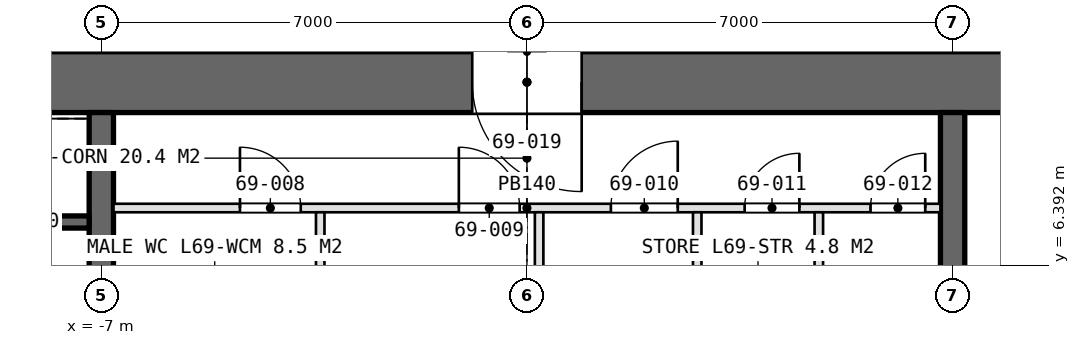
"""IFC4 building model, lengths in metres.
Left out: names, types, materials, properties, quantities, classifications, styles, units other than length and angle.
Written with IfcOpenShell. Run it as: python <this file> out.ifc"""

import sys

from ifc_helpers import new_model, si_unit, direction, frame, frame_2d, origin, place, context, subcontext, project, spatial, rectangle, extrude, element, fill, save


model = new_model("IFC4")
c1 = context("Model", 3, precision=1e-05, world=origin(), true_north=direction((0.0, 1.0)))
c2 = subcontext(c1, "Body", "Model", "MODEL_VIEW")
j1 = project(units=[si_unit("LENGTHUNIT", "METRE"), si_unit("PLANEANGLEUNIT", "RADIAN")], contexts=[c1])
p1 = place(None, origin())
s1 = spatial("IfcSite", under=j1, at=p1, CompositionType="ELEMENT")
p2 = place(p1, origin())
s2 = spatial("IfcBuilding", under=s1, at=p2, CompositionType="ELEMENT")
p3 = place(p2, frame((0.0, 0.0, 309.0)))
s3 = spatial("IfcBuildingStorey", under=s2, at=p3, CompositionType="ELEMENT", Elevation=309.0)
p4 = place(p3, frame((13.9, 9.4, 0.0), z_axis=(0.0, 0.0, 1.0), x_axis=(-1.0, 0.0, 0.0)))
e1 = element("IfcWall", 1, at=p4, inside=s3, PredefinedType="SHEAR", context=c2, shape_type="SweptSolid", body=[
    extrude(rectangle(XDim=27.8, YDim=1.0, at=frame_2d((13.9, 0.0))), origin(), (0.0, 0.0, 1.0), 4.2),
])
p5 = place(p4, frame((23.9, 0.0, 0.0)))
e2 = element("IfcOpeningElement", 2, at=p5, cuts=e1, PredefinedType="OPENING", context=c2, shape_type="SweptSolid", body=[
    extrude(rectangle(XDim=1.0, YDim=2.4, at=frame_2d((0.5, 1.2))), frame((0.0, 0.51, 0.0), z_axis=(0.0, -1.0, 0.0), x_axis=(1.0, 0.0, 0.0)), (0.0, 0.0, 1.0), 1.02),
])
p6 = place(p4, frame((13.0, 0.0, 0.0)))
e3 = element("IfcOpeningElement", 3, at=p6, cuts=e1, PredefinedType="OPENING", context=c2, shape_type="SweptSolid", body=[
    extrude(rectangle(XDim=1.8, YDim=2.4, at=frame_2d((0.9, 1.2))), frame((0.0, 0.51, 0.0), z_axis=(0.0, -1.0, 0.0), x_axis=(1.0, 0.0, 0.0)), (0.0, 0.0, 1.0), 1.02),
])
p7 = place(p3, frame((-7.0, -8.9, 0.0), z_axis=(0.0, 0.0, 1.0), x_axis=(0.0, 1.0, 0.0)))
e4 = element("IfcWall", 4, at=p7, inside=s3, PredefinedType="SHEAR", context=c2, shape_type="SweptSolid", body=[
    extrude(rectangle(XDim=17.8, YDim=0.4, at=frame_2d((8.9, 0.0))), origin(), (0.0, 0.0, 1.0), 4.2),
])
p8 = place(p7, frame((8.0, 0.0, 0.0)))
e5 = element("IfcOpeningElement", 5, at=p8, cuts=e4, PredefinedType="OPENING", context=c2, shape_type="SweptSolid", body=[
    extrude(rectangle(XDim=1.8, YDim=2.4, at=frame_2d((0.9, 1.2))), frame((0.0, 0.21, 0.0), z_axis=(0.0, -1.0, 0.0), x_axis=(1.0, 0.0, 0.0)), (0.0, 0.0, 1.0), 0.42),
])
p9 = place(p3, frame((7.0, -8.9, 0.0), z_axis=(0.0, 0.0, 1.0), x_axis=(0.0, 1.0, 0.0)))
e6 = element("IfcWall", 6, at=p9, inside=s3, PredefinedType="SHEAR", context=c2, shape_type="SweptSolid", body=[
    extrude(rectangle(XDim=17.8, YDim=0.4, at=frame_2d((8.9, 0.0))), origin(), (0.0, 0.0, 1.0), 4.2),
])
p10 = place(p9, frame((8.0, 0.0, 0.0)))
e7 = element("IfcOpeningElement", 7, at=p10, cuts=e6, PredefinedType="OPENING", context=c2, shape_type="SweptSolid", body=[
    extrude(rectangle(XDim=1.8, YDim=2.4, at=frame_2d((0.9, 1.2))), frame((0.0, 0.21, 0.0), z_axis=(0.0, -1.0, 0.0), x_axis=(1.0, 0.0, 0.0)), (0.0, 0.0, 1.0), 0.42),
])
p11 = place(p3, frame((-6.8, 7.33, 0.0), z_axis=(0.0, 0.0, 1.0), x_axis=(1.0, 0.0, 0.0)))
e8 = element("IfcWall", 8, at=p11, inside=s3, PredefinedType="PARTITIONING", context=c2, shape_type="SweptSolid", body=[
    extrude(rectangle(XDim=13.6, YDim=0.14, at=frame_2d((6.8, 0.0))), origin(), (0.0, 0.0, 1.0), 3.95),
])
p12 = place(p11, frame((2.08, 0.0, 0.0)))
e9 = element("IfcOpeningElement", 9, at=p12, cuts=e8, PredefinedType="OPENING", context=c2, shape_type="SweptSolid", body=[
    extrude(rectangle(XDim=1.0, YDim=2.4, at=frame_2d((0.5, 1.2))), frame((0.0, 0.08, 0.0), z_axis=(0.0, -1.0, 0.0), x_axis=(1.0, 0.0, 0.0)), (0.0, 0.0, 1.0), 0.16),
])
p13 = place(p11, frame((5.68, 0.0, 0.0)))
e10 = element("IfcOpeningElement", 10, at=p13, cuts=e8, PredefinedType="OPENING", context=c2, shape_type="SweptSolid", body=[
    extrude(rectangle(XDim=1.0, YDim=2.4, at=frame_2d((0.5, 1.2))), frame((0.0, 0.08, 0.0), z_axis=(0.0, -1.0, 0.0), x_axis=(1.0, 0.0, 0.0)), (0.0, 0.0, 1.0), 0.16),
])
p14 = place(p11, frame((8.18, 0.0, 0.0)))
e11 = element("IfcOpeningElement", 11, at=p14, cuts=e8, PredefinedType="OPENING", context=c2, shape_type="SweptSolid", body=[
    extrude(rectangle(XDim=1.1, YDim=2.4, at=frame_2d((0.55, 1.2))), frame((0.0, 0.08, 0.0), z_axis=(0.0, -1.0, 0.0), x_axis=(1.0, 0.0, 0.0)), (0.0, 0.0, 1.0), 0.16),
])
p15 = place(p11, frame((10.38, 0.0, 0.0)))
e12 = element("IfcOpeningElement", 12, at=p15, cuts=e8, PredefinedType="OPENING", context=c2, shape_type="SweptSolid", body=[
    extrude(rectangle(XDim=0.9, YDim=2.4, at=frame_2d((0.45, 1.2))), frame((0.0, 0.08, 0.0), z_axis=(0.0, -1.0, 0.0), x_axis=(1.0, 0.0, 0.0)), (0.0, 0.0, 1.0), 0.16),
])
p16 = place(p11, frame((12.45, 0.0, 0.0)))
e13 = element("IfcOpeningElement", 13, at=p16, cuts=e8, PredefinedType="OPENING", context=c2, shape_type="SweptSolid", body=[
    extrude(rectangle(XDim=0.9, YDim=2.4, at=frame_2d((0.45, 1.2))), frame((0.0, 0.08, 0.0), z_axis=(0.0, -1.0, 0.0), x_axis=(1.0, 0.0, 0.0)), (0.0, 0.0, 1.0), 0.16),
])
for number, where, z_axis, x_axis in (
    (14, (-3.4, 4.7, 0.0), (0.0, 0.0, 1.0), (0.0, 1.0, 0.0)),
    (15, (0.2, 4.7, 0.0), (0.0, 0.0, 1.0), (0.0, 1.0, 0.0)),
    (16, (2.8, 4.7, 0.0), (0.0, 0.0, 1.0), (0.0, 1.0, 0.0)),
    (17, (4.8, 4.7, 0.0), (0.0, 0.0, 1.0), (0.0, 1.0, 0.0)),
):
    element("IfcWall", number, at=place(p3, frame(where, z_axis=z_axis, x_axis=x_axis)), inside=s3, PredefinedType="PARTITIONING", context=c2, shape_type="SweptSolid", body=[
        extrude(rectangle(XDim=2.56, YDim=0.14, at=frame_2d((1.28, 0.0))), origin(), (0.0, 0.0, 1.0), 3.95),
    ])
p17 = place(p3, frame((-9.15, 7.1, 0.0), z_axis=(0.0, 0.0, 1.0), x_axis=(1.0, 0.0, 0.0)))
e18 = element("IfcWall", 18, at=p17, inside=s3, PredefinedType="SOLIDWALL", context=c2, shape_type="SweptSolid", body=[
    extrude(rectangle(XDim=1.95, YDim=0.2, at=frame_2d((0.975, 0.0))), origin(), (0.0, 0.0, 1.0), 4.2),
])
p18 = place(p12, origin())
e19 = element("IfcDoor", 19, at=p18, inside=s3, OperationType="SINGLE_SWING_LEFT", PredefinedType="DOOR", context=c2, shape_type="SweptSolid", body=[
    extrude(rectangle(XDim=1.0, YDim=2.4, at=frame_2d((0.5, 1.2))), frame((0.0, 0.025, 0.0), z_axis=(0.0, -1.0, 0.0), x_axis=(1.0, 0.0, 0.0)), (0.0, 0.0, 1.0), 0.05),
])
fill(e9, e19)
p19 = place(p13, origin())
e20 = element("IfcDoor", 20, at=p19, inside=s3, OperationType="SINGLE_SWING_LEFT", PredefinedType="DOOR", context=c2, shape_type="SweptSolid", body=[
    extrude(rectangle(XDim=1.0, YDim=2.4, at=frame_2d((0.5, 1.2))), frame((0.0, 0.025, 0.0), z_axis=(0.0, -1.0, 0.0), x_axis=(1.0, 0.0, 0.0)), (0.0, 0.0, 1.0), 0.05),
])
fill(e10, e20)
p20 = place(p14, origin())
e21 = element("IfcDoor", 21, at=p20, inside=s3, OperationType="SINGLE_SWING_RIGHT", PredefinedType="DOOR", context=c2, shape_type="SweptSolid", body=[
    extrude(rectangle(XDim=1.1, YDim=2.4, at=frame_2d((0.55, 1.2))), frame((0.0, 0.025, 0.0), z_axis=(0.0, -1.0, 0.0), x_axis=(1.0, 0.0, 0.0)), (0.0, 0.0, 1.0), 0.05),
])
fill(e11, e21)
p21 = place(p15, origin())
e22 = element("IfcDoor", 22, at=p21, inside=s3, OperationType="SINGLE_SWING_RIGHT", PredefinedType="DOOR", context=c2, shape_type="SweptSolid", body=[
    extrude(rectangle(XDim=0.9, YDim=2.4, at=frame_2d((0.45, 1.2))), frame((0.0, 0.025, 0.0), z_axis=(0.0, -1.0, 0.0), x_axis=(1.0, 0.0, 0.0)), (0.0, 0.0, 1.0), 0.05),
])
fill(e12, e22)
p22 = place(p16, origin())
e23 = element("IfcDoor", 23, at=p22, inside=s3, OperationType="SINGLE_SWING_RIGHT", PredefinedType="DOOR", context=c2, shape_type="SweptSolid", body=[
    extrude(rectangle(XDim=0.9, YDim=2.4, at=frame_2d((0.45, 1.2))), frame((0.0, 0.025, 0.0), z_axis=(0.0, -1.0, 0.0), x_axis=(1.0, 0.0, 0.0)), (0.0, 0.0, 1.0), 0.05),
])
fill(e13, e23)
p23 = place(p6, origin())
e24 = element("IfcDoor", 24, at=p23, inside=s3, OperationType="DOUBLE_DOOR_SINGLE_SWING", PredefinedType="DOOR", context=c2, shape_type="SweptSolid", body=[
    extrude(rectangle(XDim=1.8, YDim=2.4, at=frame_2d((0.9, 1.2))), frame((0.0, 0.025, 0.0), z_axis=(0.0, -1.0, 0.0), x_axis=(1.0, 0.0, 0.0)), (0.0, 0.0, 1.0), 0.05),
])
fill(e3, e24)
save(model, sys.argv[1])
